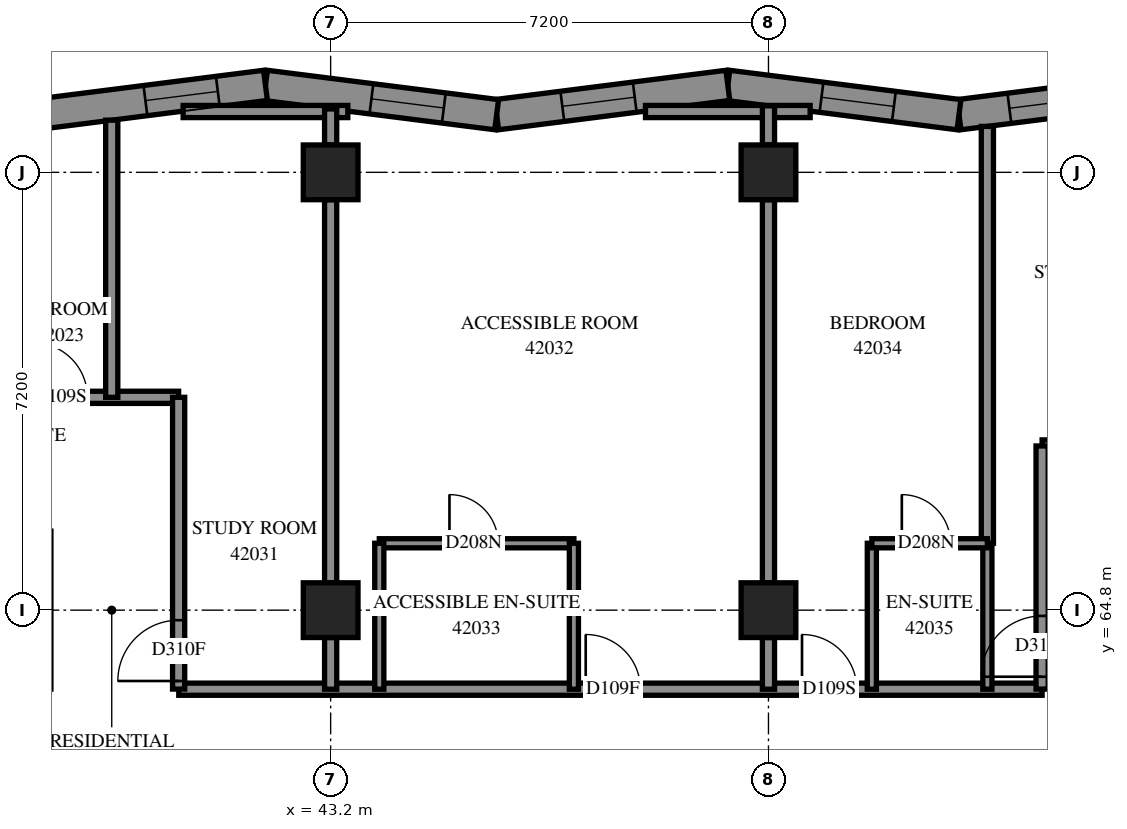
"""IFC4 building model, lengths in metres.
Left out: names, types, materials, properties, quantities, classifications, styles, units other than length and angle.
Written with IfcOpenShell. Run it as: python <this file> out.ifc"""

import sys

from ifc_helpers import new_model, si_unit, direction, frame, frame_2d, origin, origin_2d, place, context, subcontext, project, spatial, polyline, rectangle, outline, extrude, element, fill, save


model = new_model("IFC4")
c1 = context("Model", 3, precision=1e-05, world=origin(), true_north=direction((0.0, 1.0)))
c2 = subcontext(c1, "Body", "Model", "MODEL_VIEW")
j1 = project(units=[si_unit("LENGTHUNIT", "METRE"), si_unit("PLANEANGLEUNIT", "RADIAN")], contexts=[c1])
p1 = place(None, origin())
s1 = spatial("IfcSite", under=j1, at=p1, CompositionType="ELEMENT")
p2 = place(p1, origin())
s2 = spatial("IfcBuilding", under=s1, at=p2, CompositionType="ELEMENT")
p3 = place(p2, frame((0.0, 0.0, 155.8)))
s3 = spatial("IfcBuildingStorey", under=s2, at=p3, CompositionType="ELEMENT", Elevation=155.8)
for number, where, z_axis, x_axis in (
    (1, (43.2, 64.8, 0.0), (0.0, 0.0, 1.0), (1.0, 0.0, 0.0)),
    (2, (43.2, 72.0, 0.0), (0.0, 0.0, 1.0), (1.0, 0.0, 0.0)),
    (3, (50.4, 64.8, 0.0), (0.0, 0.0, 1.0), (1.0, 0.0, 0.0)),
    (4, (50.4, 72.0, 0.0), (0.0, 0.0, 1.0), (1.0, 0.0, 0.0)),
):
    element("IfcColumn", number, at=place(p3, frame(where, z_axis=z_axis, x_axis=x_axis)), inside=s3, PredefinedType="COLUMN", context=c2, shape_type="SweptSolid", body=[
        extrude(rectangle(XDim=0.9, YDim=0.9, at=origin_2d()), origin(), (0.0, 0.0, 1.0), 3.1),
    ])
p4 = place(p3, frame((57.335, 73.43, 0.0), z_axis=(0.0, 0.0, 1.0), x_axis=(-0.9920583495, -0.1257785003, 0.0)))
e5 = element("IfcWall", 5, at=p4, inside=s3, PredefinedType="SOLIDWALL", context=c2, shape_type="SweptSolid", body=[
    extrude(outline(polyline([(-0.032, -0.25), (3.8, -0.25), (3.864, 0.25), (0.032, 0.25), (-0.032, -0.25)])), origin(), (0.0, 0.0, 1.0), 3.1),
])
p5 = place(p4, frame((0.447, 0.0, 0.45)))
e6 = element("IfcOpeningElement", 6, at=p5, cuts=e5, PredefinedType="OPENING", context=c2, shape_type="SweptSolid", body=[
    extrude(rectangle(XDim=0.8, YDim=2.5, at=frame_2d((0.4, 1.25))), frame((0.0, 0.26, 0.0), z_axis=(0.0, -1.0, 0.0), x_axis=(1.0, 0.0, 0.0)), (0.0, 0.0, 1.0), 0.52),
])
p6 = place(p4, frame((1.697, 0.0, 0.45)))
e7 = element("IfcOpeningElement", 7, at=p6, cuts=e5, PredefinedType="OPENING", context=c2, shape_type="SweptSolid", body=[
    extrude(rectangle(XDim=1.3, YDim=2.5, at=frame_2d((0.65, 1.25))), frame((0.0, 0.26, 0.0), z_axis=(0.0, -1.0, 0.0), x_axis=(1.0, 0.0, 0.0)), (0.0, 0.0, 1.0), 0.52),
])
p7 = place(p3, frame((53.533, 72.948, 0.0), z_axis=(0.0, 0.0, 1.0), x_axis=(-0.9920583495, 0.1257785003, 0.0)))
e8 = element("IfcWall", 8, at=p7, inside=s3, PredefinedType="SOLIDWALL", context=c2, shape_type="SweptSolid", body=[
    extrude(outline(polyline([(0.032, -0.25), (3.864, -0.25), (3.8, 0.25), (-0.032, 0.25), (0.032, -0.25)])), origin(), (0.0, 0.0, 1.0), 3.1),
])
p8 = place(p7, frame((1.079, 0.0, 0.45)))
e9 = element("IfcOpeningElement", 9, at=p8, cuts=e8, PredefinedType="OPENING", context=c2, shape_type="SweptSolid", body=[
    extrude(rectangle(XDim=1.2, YDim=2.5, at=frame_2d((0.6, 1.25))), frame((0.0, 0.26, 0.0), z_axis=(0.0, -1.0, 0.0), x_axis=(1.0, 0.0, 0.0)), (0.0, 0.0, 1.0), 0.52),
])
p9 = place(p3, frame((49.732, 73.43, 0.0), z_axis=(0.0, 0.0, 1.0), x_axis=(-0.9920583495, -0.1257785003, 0.0)))
e10 = element("IfcWall", 10, at=p9, inside=s3, PredefinedType="SOLIDWALL", context=c2, shape_type="SweptSolid", body=[
    extrude(outline(polyline([(-0.032, -0.25), (3.8, -0.25), (3.864, 0.25), (0.032, 0.25), (-0.032, -0.25)])), origin(), (0.0, 0.0, 1.0), 3.1),
])
p10 = place(p9, frame((1.543, 0.0, 0.45)))
e11 = element("IfcOpeningElement", 11, at=p10, cuts=e10, PredefinedType="OPENING", context=c2, shape_type="SweptSolid", body=[
    extrude(rectangle(XDim=1.2, YDim=2.5, at=frame_2d((0.6, 1.25))), frame((0.0, 0.26, 0.0), z_axis=(0.0, -1.0, 0.0), x_axis=(1.0, 0.0, 0.0)), (0.0, 0.0, 1.0), 0.52),
])
p11 = place(p3, frame((45.93, 72.948, 0.0), z_axis=(0.0, 0.0, 1.0), x_axis=(-0.9920583495, 0.1257785003, 0.0)))
e12 = element("IfcWall", 12, at=p11, inside=s3, PredefinedType="SOLIDWALL", context=c2, shape_type="SweptSolid", body=[
    extrude(outline(polyline([(0.032, -0.25), (3.864, -0.25), (3.8, 0.25), (-0.032, 0.25), (0.032, -0.25)])), origin(), (0.0, 0.0, 1.0), 3.1),
])
p12 = place(p11, frame((0.876, 0.0, 0.45)))
e13 = element("IfcOpeningElement", 13, at=p12, cuts=e12, PredefinedType="OPENING", context=c2, shape_type="SweptSolid", body=[
    extrude(rectangle(XDim=1.2, YDim=2.5, at=frame_2d((0.6, 1.25))), frame((0.0, 0.26, 0.0), z_axis=(0.0, -1.0, 0.0), x_axis=(1.0, 0.0, 0.0)), (0.0, 0.0, 1.0), 0.52),
])
p13 = place(p3, frame((42.128, 73.43, 0.0), z_axis=(0.0, 0.0, 1.0), x_axis=(-0.9920583495, -0.1257785003, 0.0)))
e14 = element("IfcWall", 14, at=p13, inside=s3, PredefinedType="SOLIDWALL", context=c2, shape_type="SweptSolid", body=[
    extrude(outline(polyline([(-0.032, -0.25), (3.8, -0.25), (3.864, 0.25), (0.032, 0.25), (-0.032, -0.25)])), origin(), (0.0, 0.0, 1.0), 3.1),
])
p14 = place(p13, frame((0.79, 0.0, 0.45)))
e15 = element("IfcOpeningElement", 15, at=p14, cuts=e14, PredefinedType="OPENING", context=c2, shape_type="SweptSolid", body=[
    extrude(rectangle(XDim=1.2, YDim=2.5, at=frame_2d((0.6, 1.25))), frame((0.0, 0.26, 0.0), z_axis=(0.0, -1.0, 0.0), x_axis=(1.0, 0.0, 0.0)), (0.0, 0.0, 1.0), 0.52),
])
p15 = place(p3, frame((54.9, 67.5, 0.0), z_axis=(0.0, 0.0, 1.0), x_axis=(1.0, 0.0, 0.0)))
e16 = element("IfcWall", 16, at=p15, inside=s3, PredefinedType="PARTITIONING", context=c2, shape_type="SweptSolid", body=[
    extrude(rectangle(XDim=19.8, YDim=0.2, at=frame_2d((9.9, 0.0))), origin(), (0.0, 0.0, 1.0), 3.1),
])
p16 = place(p15, frame((6.599, 0.0, 0.0)))
e17 = element("IfcOpeningElement", 17, at=p16, cuts=e16, PredefinedType="OPENING", context=c2, shape_type="SweptSolid", body=[
    extrude(rectangle(XDim=0.9, YDim=2.1, at=frame_2d((0.45, 1.05))), frame((0.0, 0.11, 0.0), z_axis=(0.0, -1.0, 0.0), x_axis=(1.0, 0.0, 0.0)), (0.0, 0.0, 1.0), 0.22),
])
p17 = place(p15, frame((13.799, 0.0, 0.0)))
e18 = element("IfcOpeningElement", 18, at=p17, cuts=e16, PredefinedType="OPENING", context=c2, shape_type="SweptSolid", body=[
    extrude(rectangle(XDim=0.9, YDim=2.1, at=frame_2d((0.45, 1.05))), frame((0.0, 0.11, 0.0), z_axis=(0.0, -1.0, 0.0), x_axis=(1.0, 0.0, 0.0)), (0.0, 0.0, 1.0), 0.22),
])
p18 = place(p3, frame((21.6, 68.3, 0.0), z_axis=(0.0, 0.0, 1.0), x_axis=(1.0, 0.0, 0.0)))
e19 = element("IfcWall", 19, at=p18, inside=s3, PredefinedType="PARTITIONING", context=c2, shape_type="SweptSolid", body=[
    extrude(rectangle(XDim=19.1, YDim=0.2, at=frame_2d((9.55, 0.0))), origin(), (0.0, 0.0, 1.0), 3.1),
])
p19 = place(p18, frame((3.899, 0.0, 0.0)))
e20 = element("IfcOpeningElement", 20, at=p19, cuts=e19, PredefinedType="OPENING", context=c2, shape_type="SweptSolid", body=[
    extrude(rectangle(XDim=0.9, YDim=2.1, at=frame_2d((0.45, 1.05))), frame((0.0, 0.11, 0.0), z_axis=(0.0, -1.0, 0.0), x_axis=(1.0, 0.0, 0.0)), (0.0, 0.0, 1.0), 0.22),
])
p20 = place(p18, frame((11.099, 0.0, 0.0)))
e21 = element("IfcOpeningElement", 21, at=p20, cuts=e19, PredefinedType="OPENING", context=c2, shape_type="SweptSolid", body=[
    extrude(rectangle(XDim=0.9, YDim=2.1, at=frame_2d((0.45, 1.05))), frame((0.0, 0.11, 0.0), z_axis=(0.0, -1.0, 0.0), x_axis=(1.0, 0.0, 0.0)), (0.0, 0.0, 1.0), 0.22),
])
p21 = place(p18, frame((16.7, 0.0, 0.0)))
e22 = element("IfcOpeningElement", 22, at=p21, cuts=e19, PredefinedType="OPENING", context=c2, shape_type="SweptSolid", body=[
    extrude(rectangle(XDim=0.9, YDim=2.1, at=frame_2d((0.45, 1.05))), frame((0.0, 0.11, 0.0), z_axis=(0.0, -1.0, 0.0), x_axis=(1.0, 0.0, 0.0)), (0.0, 0.0, 1.0), 0.22),
])
p22 = place(p3, frame((40.702, 63.5, 0.0), z_axis=(0.0, 0.0, 1.0), x_axis=(1.0, 0.0, 0.0)))
e23 = element("IfcWall", 23, at=p22, inside=s3, PredefinedType="PARTITIONING", context=c2, shape_type="SweptSolid", body=[
    extrude(rectangle(XDim=14.198, YDim=0.2, at=frame_2d((7.099, 0.0))), origin(), (0.0, 0.0, 1.0), 3.1),
])
p23 = place(p22, frame((6.692, 0.0, 0.0)))
e24 = element("IfcOpeningElement", 24, at=p23, cuts=e23, PredefinedType="OPENING", context=c2, shape_type="SweptSolid", body=[
    extrude(rectangle(XDim=0.9, YDim=2.1, at=frame_2d((0.45, 1.05))), frame((0.0, 0.11, 0.0), z_axis=(0.0, -1.0, 0.0), x_axis=(1.0, 0.0, 0.0)), (0.0, 0.0, 1.0), 0.22),
])
p24 = place(p22, frame((10.25, 0.0, 0.0)))
e25 = element("IfcOpeningElement", 25, at=p24, cuts=e23, PredefinedType="OPENING", context=c2, shape_type="SweptSolid", body=[
    extrude(rectangle(XDim=0.9, YDim=2.1, at=frame_2d((0.45, 1.05))), frame((0.0, 0.11, 0.0), z_axis=(0.0, -1.0, 0.0), x_axis=(1.0, 0.0, 0.0)), (0.0, 0.0, 1.0), 0.22),
])
p25 = place(p3, frame((54.0, 65.9, 0.0), z_axis=(0.0, 0.0, 1.0), x_axis=(0.0, 1.0, 0.0)))
e26 = element("IfcWall", 26, at=p25, inside=s3, PredefinedType="PARTITIONING", context=c2, shape_type="SweptSolid", body=[
    extrude(rectangle(XDim=6.855, YDim=0.2, at=frame_2d((3.428, 0.0))), origin(), (0.0, 0.0, 1.0), 3.1),
])
for number, where, z_axis, x_axis in (
    (27, (43.2, 65.25, 0.0), (0.0, 0.0, 1.0), (0.0, 1.0, 0.0)),
    (28, (50.4, 65.25, 0.0), (0.0, 0.0, 1.0), (0.0, 1.0, 0.0)),
):
    element("IfcWall", number, at=place(p3, frame(where, z_axis=z_axis, x_axis=x_axis)), inside=s3, PredefinedType="PARTITIONING", context=c2, shape_type="SweptSolid", body=[
        extrude(rectangle(XDim=6.3, YDim=0.2, at=frame_2d((3.15, 0.0))), origin(), (0.0, 0.0, 1.0), 3.1),
    ])
p26 = place(p3, frame((40.7, 63.502, 0.0), z_axis=(0.0, 0.0, 1.0), x_axis=(0.0, 1.0, 0.0)))
e29 = element("IfcWall", 29, at=p26, inside=s3, PredefinedType="PARTITIONING", context=c2, shape_type="SweptSolid", body=[
    extrude(rectangle(XDim=4.798, YDim=0.2, at=frame_2d((2.399, 0.0))), origin(), (0.0, 0.0, 1.0), 3.1),
])
p27 = place(p26, frame((0.133, 0.0, 0.0)))
e30 = element("IfcOpeningElement", 30, at=p27, cuts=e29, PredefinedType="OPENING", context=c2, shape_type="SweptSolid", body=[
    extrude(rectangle(XDim=1.0, YDim=2.1, at=frame_2d((0.5, 1.05))), frame((0.0, 0.11, 0.0), z_axis=(0.0, -1.0, 0.0), x_axis=(1.0, 0.0, 0.0)), (0.0, 0.0, 1.0), 0.22),
])
p28 = place(p3, frame((39.6, 68.3, 0.0), z_axis=(0.0, 0.0, 1.0), x_axis=(0.0, 1.0, 0.0)))
e31 = element("IfcWall", 31, at=p28, inside=s3, PredefinedType="PARTITIONING", context=c2, shape_type="SweptSolid", body=[
    extrude(rectangle(XDim=4.558, YDim=0.2, at=frame_2d((2.279, 0.0))), origin(), (0.0, 0.0, 1.0), 3.1),
])
p29 = place(p3, frame((54.9, 63.502, 0.0), z_axis=(0.0, 0.0, 1.0), x_axis=(0.0, 1.0, 0.0)))
e32 = element("IfcWall", 32, at=p29, inside=s3, PredefinedType="PARTITIONING", context=c2, shape_type="SweptSolid", body=[
    extrude(rectangle(XDim=3.998, YDim=0.2, at=frame_2d((1.999, 0.0))), origin(), (0.0, 0.0, 1.0), 3.1),
])
p30 = place(p29, frame((0.203, 0.0, 0.0)))
e33 = element("IfcOpeningElement", 33, at=p30, cuts=e32, PredefinedType="OPENING", context=c2, shape_type="SweptSolid", body=[
    extrude(rectangle(XDim=1.0, YDim=2.1, at=frame_2d((0.5, 1.05))), frame((0.0, 0.11, 0.0), z_axis=(0.0, -1.0, 0.0), x_axis=(1.0, 0.0, 0.0)), (0.0, 0.0, 1.0), 0.22),
])
p31 = place(p3, frame((44.0, 65.9, 0.0), z_axis=(0.0, 0.0, 1.0), x_axis=(1.0, 0.0, 0.0)))
e34 = element("IfcWall", 34, at=p31, inside=s3, PredefinedType="PARTITIONING", context=c2, shape_type="SweptSolid", body=[
    extrude(rectangle(XDim=3.2, YDim=0.15, at=frame_2d((1.6, 0.0))), origin(), (0.0, 0.0, 1.0), 3.1),
])
p32 = place(p31, frame((1.154, 0.0, 0.0)))
e35 = element("IfcOpeningElement", 35, at=p32, cuts=e34, PredefinedType="OPENING", context=c2, shape_type="SweptSolid", body=[
    extrude(rectangle(XDim=0.8, YDim=2.1, at=frame_2d((0.4, 1.05))), frame((0.0, 0.085, 0.0), z_axis=(0.0, -1.0, 0.0), x_axis=(1.0, 0.0, 0.0)), (0.0, 0.0, 1.0), 0.17),
])
for number, where, z_axis, x_axis in (
    (36, (48.378, 73.0, 0.0), (0.0, 0.0, 1.0), (1.0, 0.0, 0.0)),
    (37, (40.774, 73.0, 0.0), (0.0, 0.0, 1.0), (1.0, 0.0, 0.0)),
):
    element("IfcWall", number, at=place(p3, frame(where, z_axis=z_axis, x_axis=x_axis)), inside=s3, PredefinedType="PARTITIONING", context=c2, shape_type="SweptSolid", body=[
        extrude(rectangle(XDim=2.708, YDim=0.2, at=frame_2d((1.354, 0.0))), origin(), (0.0, 0.0, 1.0), 3.1),
    ])
for number, where, z_axis, x_axis in (
    (38, (44.0, 63.5, 0.0), (0.0, 0.0, 1.0), (0.0, 1.0, 0.0)),
    (39, (47.2, 63.5, 0.0), (0.0, 0.0, 1.0), (0.0, 1.0, 0.0)),
    (40, (52.1, 63.5, 0.0), (0.0, 0.0, 1.0), (0.0, 1.0, 0.0)),
    (41, (54.0, 63.5, 0.0), (0.0, 0.0, 1.0), (0.0, 1.0, 0.0)),
):
    element("IfcWall", number, at=place(p3, frame(where, z_axis=z_axis, x_axis=x_axis)), inside=s3, PredefinedType="PARTITIONING", context=c2, shape_type="SweptSolid", body=[
        extrude(rectangle(XDim=2.4, YDim=0.15, at=frame_2d((1.2, 0.0))), origin(), (0.0, 0.0, 1.0), 3.1),
    ])
p33 = place(p3, frame((52.1, 65.9, 0.0), z_axis=(0.0, 0.0, 1.0), x_axis=(1.0, 0.0, 0.0)))
e42 = element("IfcWall", 42, at=p33, inside=s3, PredefinedType="PARTITIONING", context=c2, shape_type="SweptSolid", body=[
    extrude(rectangle(XDim=1.9, YDim=0.15, at=frame_2d((0.95, 0.0))), origin(), (0.0, 0.0, 1.0), 3.1),
])
p34 = place(p33, frame((0.493, 0.0, 0.0)))
e43 = element("IfcOpeningElement", 43, at=p34, cuts=e42, PredefinedType="OPENING", context=c2, shape_type="SweptSolid", body=[
    extrude(rectangle(XDim=0.8, YDim=2.1, at=frame_2d((0.4, 1.05))), frame((0.0, 0.085, 0.0), z_axis=(0.0, -1.0, 0.0), x_axis=(1.0, 0.0, 0.0)), (0.0, 0.0, 1.0), 0.17),
])
for number, where, z_axis, x_axis in (
    (44, (43.2, 63.5, 0.0), (0.0, 0.0, 1.0), (0.0, 1.0, 0.0)),
    (45, (50.4, 63.5, 0.0), (0.0, 0.0, 1.0), (0.0, 1.0, 0.0)),
):
    element("IfcWall", number, at=place(p3, frame(where, z_axis=z_axis, x_axis=x_axis)), inside=s3, PredefinedType="PARTITIONING", context=c2, shape_type="SweptSolid", body=[
        extrude(rectangle(XDim=0.85, YDim=0.2, at=frame_2d((0.425, 0.0))), origin(), (0.0, 0.0, 1.0), 3.1),
    ])
p35 = place(p3, frame((50.4, 72.45, 0.0), z_axis=(0.0, 0.0, 1.0), x_axis=(0.0, 1.0, 0.0)))
e46 = element("IfcWall", 46, at=p35, inside=s3, PredefinedType="PARTITIONING", context=c2, shape_type="SweptSolid", body=[
    extrude(rectangle(XDim=0.643, YDim=0.2, at=frame_2d((0.322, 0.0))), origin(), (0.0, 0.0, 1.0), 3.1),
])
p36 = place(p3, frame((43.2, 72.45, 0.0), z_axis=(0.0, 0.0, 1.0), x_axis=(0.0, 1.0, 0.0)))
e47 = element("IfcWall", 47, at=p36, inside=s3, PredefinedType="PARTITIONING", context=c2, shape_type="SweptSolid", body=[
    extrude(rectangle(XDim=0.592, YDim=0.2, at=frame_2d((0.296, 0.0))), origin(), (0.0, 0.0, 1.0), 3.1),
])
p37 = place(p8, origin())
e48 = element("IfcWindow", 48, at=p37, inside=s3, PartitioningType="SINGLE_PANEL", PredefinedType="WINDOW", context=c2, shape_type="SweptSolid", body=[
    extrude(rectangle(XDim=1.2, YDim=2.5, at=frame_2d((0.6, 1.25))), frame((0.0, 0.18, 0.0), z_axis=(0.0, -1.0, 0.0), x_axis=(1.0, 0.0, 0.0)), (0.0, 0.0, 1.0), 0.06),
])
fill(e9, e48)
p38 = place(p10, origin())
e49 = element("IfcWindow", 49, at=p38, inside=s3, PartitioningType="SINGLE_PANEL", PredefinedType="WINDOW", context=c2, shape_type="SweptSolid", body=[
    extrude(rectangle(XDim=1.2, YDim=2.5, at=frame_2d((0.6, 1.25))), frame((0.0, 0.18, 0.0), z_axis=(0.0, -1.0, 0.0), x_axis=(1.0, 0.0, 0.0)), (0.0, 0.0, 1.0), 0.06),
])
fill(e11, e49)
p39 = place(p12, origin())
e50 = element("IfcWindow", 50, at=p39, inside=s3, PartitioningType="SINGLE_PANEL", PredefinedType="WINDOW", context=c2, shape_type="SweptSolid", body=[
    extrude(rectangle(XDim=1.2, YDim=2.5, at=frame_2d((0.6, 1.25))), frame((0.0, 0.18, 0.0), z_axis=(0.0, -1.0, 0.0), x_axis=(1.0, 0.0, 0.0)), (0.0, 0.0, 1.0), 0.06),
])
fill(e13, e50)
p40 = place(p14, origin())
e51 = element("IfcWindow", 51, at=p40, inside=s3, PartitioningType="SINGLE_PANEL", PredefinedType="WINDOW", context=c2, shape_type="SweptSolid", body=[
    extrude(rectangle(XDim=1.2, YDim=2.5, at=frame_2d((0.6, 1.25))), frame((0.0, 0.12, 0.0), z_axis=(0.0, -1.0, 0.0), x_axis=(1.0, 0.0, 0.0)), (0.0, 0.0, 1.0), 0.06),
])
fill(e15, e51)
p41 = place(p21, origin())
e52 = element("IfcDoor", 52, at=p41, inside=s3, OperationType="SINGLE_SWING_RIGHT", PredefinedType="DOOR", context=c2, shape_type="SweptSolid", body=[
    extrude(rectangle(XDim=0.9, YDim=2.1, at=frame_2d((0.45, 1.05))), frame((0.0, 0.025, 0.0), z_axis=(0.0, -1.0, 0.0), x_axis=(1.0, 0.0, 0.0)), (0.0, 0.0, 1.0), 0.05),
])
fill(e22, e52)
p42 = place(p27, origin())
e53 = element("IfcDoor", 53, at=p42, inside=s3, OperationType="SINGLE_SWING_LEFT", PredefinedType="DOOR", context=c2, shape_type="SweptSolid", body=[
    extrude(rectangle(XDim=1.0, YDim=2.1, at=frame_2d((0.5, 1.05))), frame((0.0, 0.025, 0.0), z_axis=(0.0, -1.0, 0.0), x_axis=(1.0, 0.0, 0.0)), (0.0, 0.0, 1.0), 0.05),
])
fill(e30, e53)
p43 = place(p23, origin())
e54 = element("IfcDoor", 54, at=p43, inside=s3, OperationType="SINGLE_SWING_RIGHT", PredefinedType="DOOR", context=c2, shape_type="SweptSolid", body=[
    extrude(rectangle(XDim=0.9, YDim=2.1, at=frame_2d((0.45, 1.05))), frame((0.0, 0.025, 0.0), z_axis=(0.0, -1.0, 0.0), x_axis=(1.0, 0.0, 0.0)), (0.0, 0.0, 1.0), 0.05),
])
fill(e24, e54)
p44 = place(p32, origin())
e55 = element("IfcDoor", 55, at=p44, inside=s3, OperationType="SINGLE_SWING_RIGHT", PredefinedType="DOOR", context=c2, shape_type="SweptSolid", body=[
    extrude(rectangle(XDim=0.8, YDim=2.1, at=frame_2d((0.4, 1.05))), frame((0.0, 0.025, 0.0), z_axis=(0.0, -1.0, 0.0), x_axis=(1.0, 0.0, 0.0)), (0.0, 0.0, 1.0), 0.05),
])
fill(e35, e55)
p45 = place(p24, origin())
e56 = element("IfcDoor", 56, at=p45, inside=s3, OperationType="SINGLE_SWING_RIGHT", PredefinedType="DOOR", context=c2, shape_type="SweptSolid", body=[
    extrude(rectangle(XDim=0.9, YDim=2.1, at=frame_2d((0.45, 1.05))), frame((0.0, 0.025, 0.0), z_axis=(0.0, -1.0, 0.0), x_axis=(1.0, 0.0, 0.0)), (0.0, 0.0, 1.0), 0.05),
])
fill(e25, e56)
p46 = place(p34, origin())
e57 = element("IfcDoor", 57, at=p46, inside=s3, OperationType="SINGLE_SWING_RIGHT", PredefinedType="DOOR", context=c2, shape_type="SweptSolid", body=[
    extrude(rectangle(XDim=0.8, YDim=2.1, at=frame_2d((0.4, 1.05))), frame((0.0, 0.025, 0.0), z_axis=(0.0, -1.0, 0.0), x_axis=(1.0, 0.0, 0.0)), (0.0, 0.0, 1.0), 0.05),
])
fill(e43, e57)
p47 = place(p30, origin())
e58 = element("IfcDoor", 58, at=p47, inside=s3, OperationType="SINGLE_SWING_LEFT", PredefinedType="DOOR", context=c2, shape_type="SweptSolid", body=[
    extrude(rectangle(XDim=1.0, YDim=2.1, at=frame_2d((0.5, 1.05))), frame((0.0, 0.025, 0.0), z_axis=(0.0, -1.0, 0.0), x_axis=(1.0, 0.0, 0.0)), (0.0, 0.0, 1.0), 0.05),
])
fill(e33, e58)
p48 = place(p6, origin())
e59 = element("IfcWindow", 59, at=p48, inside=s3, PartitioningType="SINGLE_PANEL", PredefinedType="WINDOW", context=c2, shape_type="SweptSolid", body=[
    extrude(rectangle(XDim=1.3, YDim=2.5, at=frame_2d((0.65, 1.25))), frame((0.0, 0.18, 0.0), z_axis=(0.0, -1.0, 0.0), x_axis=(1.0, 0.0, 0.0)), (0.0, 0.0, 1.0), 0.06),
])
fill(e7, e59)
save(model, sys.argv[1])
